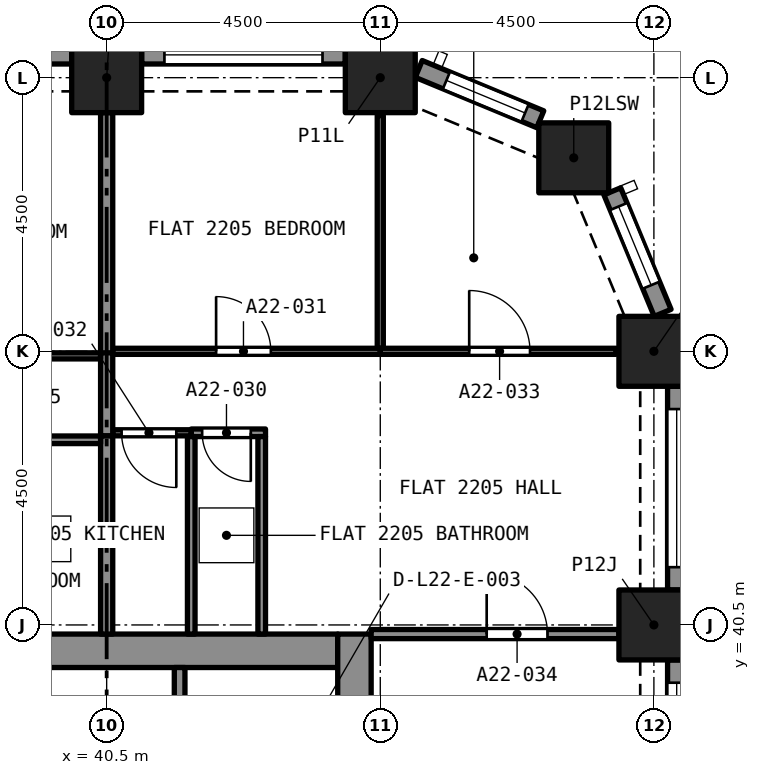
"""IFC4 building model, lengths in metres.
Left out: names, types, materials, properties, quantities, classifications, styles, units other than length and angle.
Written with IfcOpenShell. Run it as: python <this file> out.ifc"""

import sys

from ifc_helpers import new_model, si_unit, direction, frame, frame_2d, origin, origin_2d, place, context, subcontext, project, spatial, rectangle, extrude, element, fill, save


model = new_model("IFC4")
c1 = context("Model", 3, precision=1e-05, world=origin(), true_north=direction((0.0, 1.0)))
c2 = subcontext(c1, "Body", "Model", "MODEL_VIEW")
j1 = project(units=[si_unit("LENGTHUNIT", "METRE"), si_unit("PLANEANGLEUNIT", "RADIAN")], contexts=[c1])
p1 = place(None, origin())
s1 = spatial("IfcSite", under=j1, at=p1, CompositionType="ELEMENT")
p2 = place(p1, origin())
s2 = spatial("IfcBuilding", under=s1, at=p2, CompositionType="ELEMENT")
p3 = place(p2, frame((0.0, 0.0, 83.2)))
s3 = spatial("IfcBuildingStorey", under=s2, at=p3, CompositionType="ELEMENT", Elevation=83.2)
for number, where, z_axis, x_axis in (
    (1, (49.5, 40.5, 0.0), (0.0, 0.0, 1.0), (1.0, 0.0, 0.0)),
    (2, (49.5, 45.0, 0.0), (0.0, 0.0, 1.0), (1.0, 0.0, 0.0)),
    (3, (48.182, 48.182, 0.0), (0.0, 0.0, 1.0), (1.0, 0.0, 0.0)),
    (4, (40.5, 49.5, 0.0), (0.0, 0.0, 1.0), (1.0, 0.0, 0.0)),
    (5, (45.0, 49.5, 0.0), (0.0, 0.0, 1.0), (1.0, 0.0, 0.0)),
):
    element("IfcColumn", number, at=place(p3, frame(where, z_axis=z_axis, x_axis=x_axis)), inside=s3, PredefinedType="COLUMN", context=c2, shape_type="SweptSolid", body=[
        extrude(rectangle(XDim=1.15, YDim=1.15, at=origin_2d()), origin(), (0.0, 0.0, 1.0), 3.2),
    ])
p4 = place(p3, frame((36.7, 40.075, 0.0), z_axis=(0.0, 0.0, 1.0), x_axis=(1.0, 0.0, 0.0)))
e6 = element("IfcWall", 6, at=p4, inside=s3, PredefinedType="SOLIDWALL", context=c2, shape_type="SweptSolid", body=[
    extrude(rectangle(XDim=7.6, YDim=0.55, at=frame_2d((3.8, 0.0))), origin(), (0.0, 0.0, 1.0), 3.2),
])
p5 = place(p3, frame((44.575, 27.15, 0.0), z_axis=(0.0, 0.0, 1.0), x_axis=(0.0, 1.0, 0.0)))
e7 = element("IfcWall", 7, at=p5, inside=s3, PredefinedType="SOLIDWALL", context=c2, shape_type="SweptSolid", body=[
    extrude(rectangle(XDim=13.2, YDim=0.55, at=frame_2d((6.6, 0.0))), origin(), (0.0, 0.0, 1.0), 3.2),
])
p6 = place(p5, frame((8.8, 0.0, 0.0)))
e8 = element("IfcOpeningElement", 8, at=p6, cuts=e7, PredefinedType="OPENING", context=c2, shape_type="SweptSolid", body=[
    extrude(rectangle(XDim=1.2, YDim=2.1, at=frame_2d((0.6, 1.05))), frame((0.0, 0.285, 0.0), z_axis=(0.0, -1.0, 0.0), x_axis=(1.0, 0.0, 0.0)), (0.0, 0.0, 1.0), 0.57),
])
p7 = place(p3, frame((49.875, 39.925, 0.0), z_axis=(0.0, 0.0, 1.0), x_axis=(0.0, -1.0, 0.0)))
e9 = element("IfcWall", 9, at=p7, inside=s3, PredefinedType="SOLIDWALL", context=c2, shape_type="SweptSolid", body=[
    extrude(rectangle(XDim=3.35, YDim=0.3, at=frame_2d((1.675, 0.0))), origin(), (0.0, 0.0, 1.0), 3.2),
])
p8 = place(p7, frame((0.375, 0.0, 0.45)))
e10 = element("IfcOpeningElement", 10, at=p8, cuts=e9, PredefinedType="OPENING", context=c2, shape_type="SweptSolid", body=[
    extrude(rectangle(XDim=2.6, YDim=1.95, at=frame_2d((1.3, 0.975))), frame((0.0, 0.16, 0.0), z_axis=(0.0, -1.0, 0.0), x_axis=(1.0, 0.0, 0.0)), (0.0, 0.0, 1.0), 0.32),
])
p9 = place(p3, frame((49.875, 44.425, 0.0), z_axis=(0.0, 0.0, 1.0), x_axis=(0.0, -1.0, 0.0)))
e11 = element("IfcWall", 11, at=p9, inside=s3, PredefinedType="SOLIDWALL", context=c2, shape_type="SweptSolid", body=[
    extrude(rectangle(XDim=3.35, YDim=0.3, at=frame_2d((1.675, 0.0))), origin(), (0.0, 0.0, 1.0), 3.2),
])
p10 = place(p9, frame((0.375, 0.0, 0.45)))
e12 = element("IfcOpeningElement", 12, at=p10, cuts=e11, PredefinedType="OPENING", context=c2, shape_type="SweptSolid", body=[
    extrude(rectangle(XDim=2.6, YDim=1.95, at=frame_2d((1.3, 0.975))), frame((0.0, 0.16, 0.0), z_axis=(0.0, -1.0, 0.0), x_axis=(1.0, 0.0, 0.0)), (0.0, 0.0, 1.0), 0.32),
])
p11 = place(p3, frame((48.816, 47.631, 0.0), z_axis=(0.0, 0.0, 1.0), x_axis=(0.382723818695, -0.923862802911, 0.0)))
e13 = element("IfcWall", 13, at=p11, inside=s3, PredefinedType="SOLIDWALL", context=c2, shape_type="SweptSolid", body=[
    extrude(rectangle(XDim=2.164, YDim=0.3, at=frame_2d((1.082, 0.0))), origin(), (0.0, 0.0, 1.0), 3.2),
])
p12 = place(p11, frame((0.271, 0.0, 0.45)))
e14 = element("IfcOpeningElement", 14, at=p12, cuts=e13, PredefinedType="OPENING", context=c2, shape_type="SweptSolid", body=[
    extrude(rectangle(XDim=1.4, YDim=1.95, at=frame_2d((0.7, 0.975))), frame((0.0, 0.16, 0.0), z_axis=(0.0, -1.0, 0.0), x_axis=(1.0, 0.0, 0.0)), (0.0, 0.0, 1.0), 0.32),
])
p13 = place(p3, frame((45.632, 49.644, 0.0), z_axis=(0.0, 0.0, 1.0), x_axis=(0.923862802911, -0.382723818695, 0.0)))
e15 = element("IfcWall", 15, at=p13, inside=s3, PredefinedType="SOLIDWALL", context=c2, shape_type="SweptSolid", body=[
    extrude(rectangle(XDim=2.164, YDim=0.3, at=frame_2d((1.082, 0.0))), origin(), (0.0, 0.0, 1.0), 3.2),
])
p14 = place(p13, frame((0.493, 0.0, 0.45)))
e16 = element("IfcOpeningElement", 16, at=p14, cuts=e15, PredefinedType="OPENING", context=c2, shape_type="SweptSolid", body=[
    extrude(rectangle(XDim=1.4, YDim=1.95, at=frame_2d((0.7, 0.975))), frame((0.0, 0.16, 0.0), z_axis=(0.0, -1.0, 0.0), x_axis=(1.0, 0.0, 0.0)), (0.0, 0.0, 1.0), 0.32),
])
p15 = place(p3, frame((41.075, 49.875, 0.0), z_axis=(0.0, 0.0, 1.0), x_axis=(1.0, 0.0, 0.0)))
e17 = element("IfcWall", 17, at=p15, inside=s3, PredefinedType="SOLIDWALL", context=c2, shape_type="SweptSolid", body=[
    extrude(rectangle(XDim=3.35, YDim=0.3, at=frame_2d((1.675, 0.0))), origin(), (0.0, 0.0, 1.0), 3.2),
])
p16 = place(p15, frame((0.375, 0.0, 0.45)))
e18 = element("IfcOpeningElement", 18, at=p16, cuts=e17, PredefinedType="OPENING", context=c2, shape_type="SweptSolid", body=[
    extrude(rectangle(XDim=2.6, YDim=1.95, at=frame_2d((1.3, 0.975))), frame((0.0, 0.16, 0.0), z_axis=(0.0, -1.0, 0.0), x_axis=(1.0, 0.0, 0.0)), (0.0, 0.0, 1.0), 0.32),
])
p17 = place(p3, frame((36.575, 49.875, 0.0), z_axis=(0.0, 0.0, 1.0), x_axis=(1.0, 0.0, 0.0)))
e19 = element("IfcWall", 19, at=p17, inside=s3, PredefinedType="SOLIDWALL", context=c2, shape_type="SweptSolid", body=[
    extrude(rectangle(XDim=3.35, YDim=0.3, at=frame_2d((1.675, 0.0))), origin(), (0.0, 0.0, 1.0), 3.2),
])
p18 = place(p17, frame((0.375, 0.0, 0.45)))
e20 = element("IfcOpeningElement", 20, at=p18, cuts=e19, PredefinedType="OPENING", context=c2, shape_type="SweptSolid", body=[
    extrude(rectangle(XDim=2.6, YDim=1.95, at=frame_2d((1.3, 0.975))), frame((0.0, 0.16, 0.0), z_axis=(0.0, -1.0, 0.0), x_axis=(1.0, 0.0, 0.0)), (0.0, 0.0, 1.0), 0.32),
])
p19 = place(p3, frame((43.113, 43.66, 0.0), z_axis=(0.0, 0.0, 1.0), x_axis=(-1.0, 0.0, 0.0)))
e21 = element("IfcWall", 21, at=p19, inside=s3, PredefinedType="PARTITIONING", context=c2, shape_type="SweptSolid", body=[
    extrude(rectangle(XDim=1.222, YDim=0.125, at=frame_2d((0.611, 0.0))), origin(), (0.0, 0.0, 1.0), 2.9),
])
p20 = place(p19, frame((0.242, 0.0, 0.0)))
e22 = element("IfcOpeningElement", 22, at=p20, cuts=e21, PredefinedType="OPENING", context=c2, shape_type="SweptSolid", body=[
    extrude(rectangle(XDim=0.8, YDim=2.1, at=frame_2d((0.4, 1.05))), frame((0.0, 0.073, 0.0), z_axis=(0.0, -1.0, 0.0), x_axis=(1.0, 0.0, 0.0)), (0.0, 0.0, 1.0), 0.145),
])
for number, where, z_axis, x_axis in (
    (23, (43.05, 40.35, 0.0), (0.0, 0.0, 1.0), (0.0, 1.0, 0.0)),
    (24, (41.891, 40.35, 0.0), (0.0, 0.0, 1.0), (0.0, 1.0, 0.0)),
):
    element("IfcWall", number, at=place(p3, frame(where, z_axis=z_axis, x_axis=x_axis)), inside=s3, PredefinedType="PARTITIONING", context=c2, shape_type="SweptSolid", body=[
        extrude(rectangle(XDim=3.247, YDim=0.125, at=frame_2d((1.624, 0.0))), origin(), (0.0, 0.0, 1.0), 2.9),
    ])
p21 = place(p3, frame((40.6, 45.0, 0.0), z_axis=(0.0, 0.0, 1.0), x_axis=(1.0, 0.0, 0.0)))
e25 = element("IfcWall", 25, at=p21, inside=s3, PredefinedType="PARTITIONING", context=c2, shape_type="SweptSolid", body=[
    extrude(rectangle(XDim=4.4, YDim=0.1, at=frame_2d((2.2, 0.0))), origin(), (0.0, 0.0, 1.0), 2.9),
])
p22 = place(p21, frame((1.7, 0.0, 0.0)))
e26 = element("IfcOpeningElement", 26, at=p22, cuts=e25, PredefinedType="OPENING", context=c2, shape_type="SweptSolid", body=[
    extrude(rectangle(XDim=0.9, YDim=2.1, at=frame_2d((0.45, 1.05))), frame((0.0, 0.06, 0.0), z_axis=(0.0, -1.0, 0.0), x_axis=(1.0, 0.0, 0.0)), (0.0, 0.0, 1.0), 0.12),
])
p23 = place(p3, frame((45.0, 45.05, 0.0), z_axis=(0.0, 0.0, 1.0), x_axis=(0.0, 1.0, 0.0)))
e27 = element("IfcWall", 27, at=p23, inside=s3, PredefinedType="PARTITIONING", context=c2, shape_type="SweptSolid", body=[
    extrude(rectangle(XDim=3.828, YDim=0.1, at=frame_2d((1.914, 0.0))), origin(), (0.0, 0.0, 1.0), 2.9),
])
p24 = place(p3, frame((40.5, 44.95, 0.0), z_axis=(0.0, 0.0, 1.0), x_axis=(0.0, 1.0, 0.0)))
e28 = element("IfcWall", 28, at=p24, inside=s3, PredefinedType="PARTITIONING", context=c2, shape_type="SweptSolid", body=[
    extrude(rectangle(XDim=3.975, YDim=0.2, at=frame_2d((1.988, 0.0))), origin(), (0.0, 0.0, 1.0), 2.9),
])
p25 = place(p3, frame((41.891, 43.66, 0.0), z_axis=(0.0, 0.0, 1.0), x_axis=(-1.0, 0.0, 0.0)))
e29 = element("IfcWall", 29, at=p25, inside=s3, PredefinedType="PARTITIONING", context=c2, shape_type="SweptSolid", body=[
    extrude(rectangle(XDim=1.291, YDim=0.1, at=frame_2d((0.646, 0.0))), origin(), (0.0, 0.0, 1.0), 2.9),
])
p26 = place(p25, frame((0.246, 0.0, 0.0)))
e30 = element("IfcOpeningElement", 30, at=p26, cuts=e29, PredefinedType="OPENING", context=c2, shape_type="SweptSolid", body=[
    extrude(rectangle(XDim=0.9, YDim=2.1, at=frame_2d((0.45, 1.05))), frame((0.0, 0.06, 0.0), z_axis=(0.0, -1.0, 0.0), x_axis=(1.0, 0.0, 0.0)), (0.0, 0.0, 1.0), 0.12),
])
p27 = place(p3, frame((45.0, 45.0, 0.0), z_axis=(0.0, 0.0, 1.0), x_axis=(1.0, 0.0, 0.0)))
e31 = element("IfcWall", 31, at=p27, inside=s3, PredefinedType="PARTITIONING", context=c2, shape_type="SweptSolid", body=[
    extrude(rectangle(XDim=3.878, YDim=0.1, at=frame_2d((1.939, 0.0))), origin(), (0.0, 0.0, 1.0), 2.9),
])
p28 = place(p27, frame((1.462, 0.0, 0.0)))
e32 = element("IfcOpeningElement", 32, at=p28, cuts=e31, PredefinedType="OPENING", context=c2, shape_type="SweptSolid", body=[
    extrude(rectangle(XDim=1.0, YDim=2.1, at=frame_2d((0.5, 1.05))), frame((0.0, 0.06, 0.0), z_axis=(0.0, -1.0, 0.0), x_axis=(1.0, 0.0, 0.0)), (0.0, 0.0, 1.0), 0.12),
])
p29 = place(p3, frame((40.5, 43.61, 0.0), z_axis=(0.0, 0.0, 1.0), x_axis=(0.0, 1.0, 0.0)))
e33 = element("IfcWall", 33, at=p29, inside=s3, PredefinedType="PARTITIONING", context=c2, shape_type="SweptSolid", body=[
    extrude(rectangle(XDim=1.365, YDim=0.2, at=frame_2d((0.683, 0.0))), origin(), (0.0, 0.0, 1.0), 2.9),
])
p30 = place(p3, frame((44.85, 40.35, 0.0), z_axis=(0.0, 0.0, 1.0), x_axis=(1.0, 0.0, 0.0)))
e34 = element("IfcWall", 34, at=p30, inside=s3, PredefinedType="PARTITIONING", context=c2, shape_type="SweptSolid", body=[
    extrude(rectangle(XDim=4.075, YDim=0.15, at=frame_2d((2.038, 0.0))), origin(), (0.0, 0.0, 1.0), 2.9),
])
p31 = place(p30, frame((1.9, 0.0, 0.0)))
e35 = element("IfcOpeningElement", 35, at=p31, cuts=e34, PredefinedType="OPENING", context=c2, shape_type="SweptSolid", body=[
    extrude(rectangle(XDim=1.0, YDim=2.1, at=frame_2d((0.5, 1.05))), frame((0.0, 0.085, 0.0), z_axis=(0.0, -1.0, 0.0), x_axis=(1.0, 0.0, 0.0)), (0.0, 0.0, 1.0), 0.17),
])
p32 = place(p3, frame((40.5, 40.35, 0.0), z_axis=(0.0, 0.0, 1.0), x_axis=(0.0, 1.0, 0.0)))
e36 = element("IfcWall", 36, at=p32, inside=s3, PredefinedType="PARTITIONING", context=c2, shape_type="SweptSolid", body=[
    extrude(rectangle(XDim=3.257, YDim=0.2, at=frame_2d((1.629, 0.0))), origin(), (0.0, 0.0, 1.0), 2.9),
])
p33 = place(p3, frame((40.4, 43.545, 0.0), z_axis=(0.0, 0.0, 1.0), x_axis=(-1.0, 0.0, 0.0)))
e37 = element("IfcWall", 37, at=p33, inside=s3, PredefinedType="PARTITIONING", context=c2, shape_type="SweptSolid", body=[
    extrude(rectangle(XDim=2.743, YDim=0.125, at=frame_2d((1.372, 0.0))), origin(), (0.0, 0.0, 1.0), 2.9),
])
p34 = place(p33, frame((0.922, 0.0, 0.0)))
e38 = element("IfcOpeningElement", 38, at=p34, cuts=e37, PredefinedType="OPENING", context=c2, shape_type="SweptSolid", body=[
    extrude(rectangle(XDim=0.8, YDim=2.1, at=frame_2d((0.4, 1.05))), frame((0.0, 0.073, 0.0), z_axis=(0.0, -1.0, 0.0), x_axis=(1.0, 0.0, 0.0)), (0.0, 0.0, 1.0), 0.145),
])
p35 = place(p3, frame((36.0, 44.925, 0.0), z_axis=(0.0, 0.0, 1.0), x_axis=(1.0, 0.0, 0.0)))
e39 = element("IfcWall", 39, at=p35, inside=s3, PredefinedType="PARTITIONING", context=c2, shape_type="SweptSolid", body=[
    extrude(rectangle(XDim=4.4, YDim=0.1, at=frame_2d((2.2, 0.0))), origin(), (0.0, 0.0, 1.0), 2.9),
])
p36 = place(p35, frame((1.8, 0.0, 0.0)))
e40 = element("IfcOpeningElement", 40, at=p36, cuts=e39, PredefinedType="OPENING", context=c2, shape_type="SweptSolid", body=[
    extrude(rectangle(XDim=0.9, YDim=2.1, at=frame_2d((0.45, 1.05))), frame((0.0, 0.06, 0.0), z_axis=(0.0, -1.0, 0.0), x_axis=(1.0, 0.0, 0.0)), (0.0, 0.0, 1.0), 0.12),
])
p37 = place(p3, frame((41.7, 37.5, 0.0), z_axis=(0.0, 0.0, 1.0), x_axis=(0.0, 1.0, 0.0)))
e41 = element("IfcWall", 41, at=p37, inside=s3, PredefinedType="SOLIDWALL", context=c2, shape_type="SweptSolid", body=[
    extrude(rectangle(XDim=2.3, YDim=0.175, at=frame_2d((1.15, 0.0))), origin(), (0.0, 0.0, 1.0), 2.9),
])
p38 = place(p8, origin())
e42 = element("IfcWindow", 42, at=p38, inside=s3, PartitioningType="SINGLE_PANEL", PredefinedType="WINDOW", context=c2, shape_type="SweptSolid", body=[
    extrude(rectangle(XDim=2.6, YDim=1.95, at=frame_2d((1.3, 0.975))), frame((0.0, 0.03, 0.0), z_axis=(0.0, -1.0, 0.0), x_axis=(1.0, 0.0, 0.0)), (0.0, 0.0, 1.0), 0.06),
])
fill(e10, e42)
p39 = place(p10, origin())
e43 = element("IfcWindow", 43, at=p39, inside=s3, PartitioningType="SINGLE_PANEL", PredefinedType="WINDOW", context=c2, shape_type="SweptSolid", body=[
    extrude(rectangle(XDim=2.6, YDim=1.95, at=frame_2d((1.3, 0.975))), frame((0.0, 0.03, 0.0), z_axis=(0.0, -1.0, 0.0), x_axis=(1.0, 0.0, 0.0)), (0.0, 0.0, 1.0), 0.06),
])
fill(e12, e43)
p40 = place(p12, origin())
e44 = element("IfcWindow", 44, at=p40, inside=s3, PartitioningType="SINGLE_PANEL", PredefinedType="WINDOW", context=c2, shape_type="SweptSolid", body=[
    extrude(rectangle(XDim=1.4, YDim=1.95, at=frame_2d((0.7, 0.975))), frame((0.0, 0.03, 0.0), z_axis=(0.0, -1.0, 0.0), x_axis=(1.0, 0.0, 0.0)), (0.0, 0.0, 1.0), 0.06),
])
fill(e14, e44)
p41 = place(p14, origin())
e45 = element("IfcWindow", 45, at=p41, inside=s3, PartitioningType="SINGLE_PANEL", PredefinedType="WINDOW", context=c2, shape_type="SweptSolid", body=[
    extrude(rectangle(XDim=1.4, YDim=1.95, at=frame_2d((0.7, 0.975))), frame((0.0, 0.03, 0.0), z_axis=(0.0, -1.0, 0.0), x_axis=(1.0, 0.0, 0.0)), (0.0, 0.0, 1.0), 0.06),
])
fill(e16, e45)
p42 = place(p16, origin())
e46 = element("IfcWindow", 46, at=p42, inside=s3, PartitioningType="SINGLE_PANEL", PredefinedType="WINDOW", context=c2, shape_type="SweptSolid", body=[
    extrude(rectangle(XDim=2.6, YDim=1.95, at=frame_2d((1.3, 0.975))), frame((0.0, 0.03, 0.0), z_axis=(0.0, -1.0, 0.0), x_axis=(1.0, 0.0, 0.0)), (0.0, 0.0, 1.0), 0.06),
])
fill(e18, e46)
p43 = place(p20, origin())
e47 = element("IfcDoor", 47, at=p43, inside=s3, OperationType="SINGLE_SWING_RIGHT", PredefinedType="DOOR", context=c2, shape_type="SweptSolid", body=[
    extrude(rectangle(XDim=0.8, YDim=2.1, at=frame_2d((0.4, 1.05))), frame((0.0, 0.025, 0.0), z_axis=(0.0, -1.0, 0.0), x_axis=(1.0, 0.0, 0.0)), (0.0, 0.0, 1.0), 0.05),
])
fill(e22, e47)
p44 = place(p22, origin())
e48 = element("IfcDoor", 48, at=p44, inside=s3, OperationType="SINGLE_SWING_LEFT", PredefinedType="DOOR", context=c2, shape_type="SweptSolid", body=[
    extrude(rectangle(XDim=0.9, YDim=2.1, at=frame_2d((0.45, 1.05))), frame((0.0, 0.025, 0.0), z_axis=(0.0, -1.0, 0.0), x_axis=(1.0, 0.0, 0.0)), (0.0, 0.0, 1.0), 0.05),
])
fill(e26, e48)
p45 = place(p26, origin())
e49 = element("IfcDoor", 49, at=p45, inside=s3, OperationType="SINGLE_SWING_RIGHT", PredefinedType="DOOR", context=c2, shape_type="SweptSolid", body=[
    extrude(rectangle(XDim=0.9, YDim=2.1, at=frame_2d((0.45, 1.05))), frame((0.0, 0.025, 0.0), z_axis=(0.0, -1.0, 0.0), x_axis=(1.0, 0.0, 0.0)), (0.0, 0.0, 1.0), 0.05),
])
fill(e30, e49)
p46 = place(p28, origin())
e50 = element("IfcDoor", 50, at=p46, inside=s3, OperationType="SINGLE_SWING_RIGHT", PredefinedType="DOOR", context=c2, shape_type="SweptSolid", body=[
    extrude(rectangle(XDim=1.0, YDim=2.1, at=frame_2d((0.5, 1.05))), frame((0.0, 0.025, 0.0), z_axis=(0.0, -1.0, 0.0), x_axis=(1.0, 0.0, 0.0)), (0.0, 0.0, 1.0), 0.05),
])
fill(e32, e50)
p47 = place(p31, origin())
e51 = element("IfcDoor", 51, at=p47, inside=s3, OperationType="SINGLE_SWING_RIGHT", PredefinedType="DOOR", context=c2, shape_type="SweptSolid", body=[
    extrude(rectangle(XDim=1.0, YDim=2.1, at=frame_2d((0.5, 1.05))), frame((0.0, 0.025, 0.0), z_axis=(0.0, -1.0, 0.0), x_axis=(1.0, 0.0, 0.0)), (0.0, 0.0, 1.0), 0.05),
])
fill(e35, e51)
save(model, sys.argv[1])
